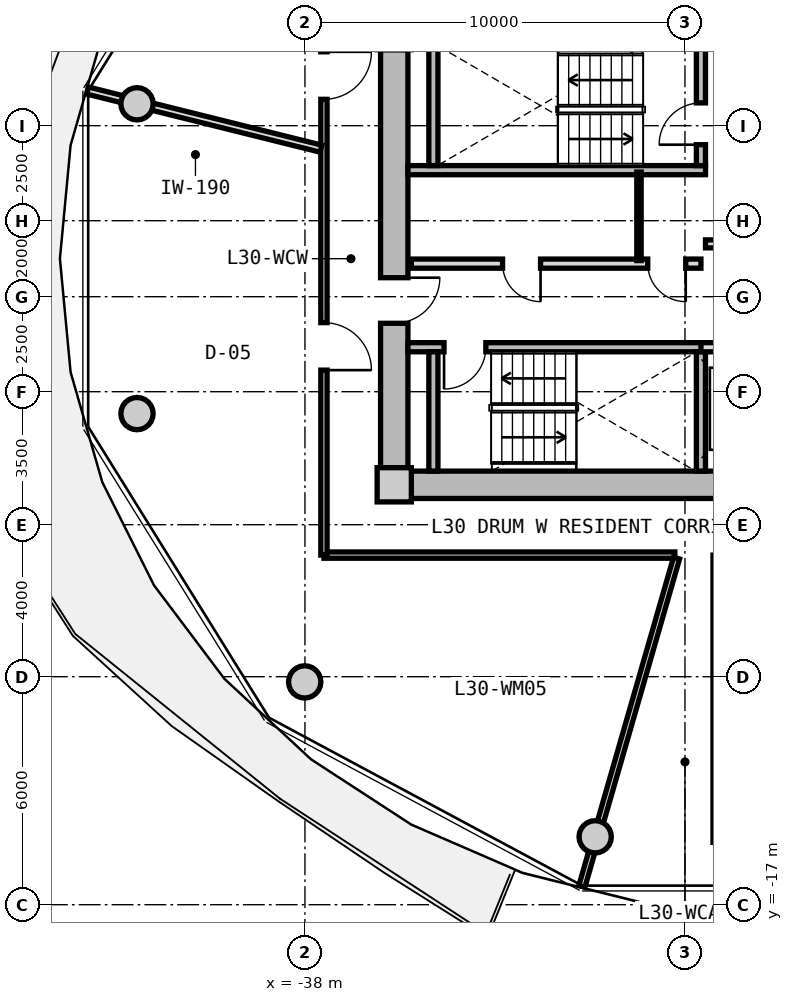
"""IFC4 building model, lengths in metres.
Left out: names, types, materials, properties, quantities, classifications, styles, units other than length and angle.
Written with IfcOpenShell. Run it as: python <this file> out.ifc"""

import sys

from ifc_helpers import new_model, si_unit, direction, frame, frame_2d, origin, origin_2d, place, context, subcontext, project, spatial, rectangle, circle, extrude, source, transform, mapped, element, fill, save


model = new_model("IFC4")
c1 = context("Model", 3, precision=1e-05, world=origin(), true_north=direction((0.0, 1.0)))
c2 = subcontext(c1, "Body", "Model", "MODEL_VIEW")
j1 = project(units=[si_unit("LENGTHUNIT", "METRE"), si_unit("PLANEANGLEUNIT", "RADIAN")], contexts=[c1])
p1 = place(None, origin())
s1 = spatial("IfcSite", under=j1, at=p1, CompositionType="ELEMENT")
p2 = place(p1, origin())
s2 = spatial("IfcBuilding", under=s1, at=p2, CompositionType="ELEMENT")
p3 = place(p2, frame((0.0, 0.0, 99.3)))
s3 = spatial("IfcBuildingStorey", under=s2, at=p3, CompositionType="ELEMENT", Elevation=99.3)
m1 = source(origin(), c2, "Body", "SweptSolid", [
    extrude(rectangle(XDim=0.9, YDim=0.9, at=origin_2d()), origin(), (0.0, 0.0, 1.0), 3.05),
])
p4 = place(p3, frame((-35.65, -5.95, 0.0), z_axis=(0.0, 0.0, 1.0), x_axis=(1.0, 0.0, 0.0)))
e1 = element("IfcColumn", 1, at=p4, inside=s3, PredefinedType="COLUMN", context=c2, shape_type="MappedRepresentation", body=[
    mapped(m1, transform((0.0, 0.0, 0.0), x_axis=(1.0, 0.0, 0.0), y_axis=(0.0, 1.0, 0.0), z_axis=(0.0, 0.0, 1.0), scale=1.0)),
])
m2 = source(origin(), c2, "Body", "SweptSolid", [
    extrude(rectangle(XDim=14.4, YDim=0.72, at=frame_2d((7.2, 0.0))), origin(), (0.0, 0.0, 1.0), 2.79),
])
p5 = place(p3, frame((-20.8, -5.95, 0.0), z_axis=(0.0, 0.0, 1.0), x_axis=(-1.0, 0.0, 0.0)))
e2 = element("IfcWall", 2, at=p5, inside=s3, PredefinedType="SHEAR", context=c2, shape_type="MappedRepresentation", body=[
    mapped(m2, transform((0.0, 0.0, 0.0), x_axis=(1.0, 0.0, 0.0), y_axis=(0.0, 1.0, 0.0), z_axis=(0.0, 0.0, 1.0), scale=1.0)),
])
m3 = source(origin(), c2, "Body", "SweptSolid", [
    extrude(rectangle(XDim=11.0, YDim=0.72, at=frame_2d((5.5, 0.0))), origin(), (0.0, 0.0, 1.0), 2.79),
])
p6 = place(p3, frame((-35.65, -5.5, 0.0), z_axis=(0.0, 0.0, 1.0), x_axis=(0.0, 1.0, 0.0)))
e3 = element("IfcWall", 3, at=p6, inside=s3, PredefinedType="SHEAR", context=c2, shape_type="MappedRepresentation", body=[
    mapped(m3, transform((0.0, 0.0, 0.0), x_axis=(1.0, 0.0, 0.0), y_axis=(0.0, 1.0, 0.0), z_axis=(0.0, 0.0, 1.0), scale=1.0)),
])
p7 = place(p6, frame((3.8, 0.0, 0.0)))
e4 = element("IfcOpeningElement", 4, at=p7, cuts=e3, PredefinedType="OPENING", context=c2, shape_type="SweptSolid", body=[
    extrude(rectangle(XDim=1.2, YDim=2.15, at=frame_2d((0.6, 1.075))), frame((0.0, 0.37, 0.0), z_axis=(0.0, -1.0, 0.0), x_axis=(1.0, 0.0, 0.0)), (0.0, 0.0, 1.0), 0.74),
])
m4 = source(origin(), c2, "Body", "SweptSolid", [
    extrude(circle(Radius=0.425, at=origin_2d()), origin(), (0.0, 0.0, 1.0), 3.05),
])
for number, where, z_axis, x_axis in (
    (5, (-42.419, 4.076, 0.0), (0.0, 0.0, 1.0), (1.0, 0.0, 0.0)),
    (6, (-42.419, -4.076, 0.0), (0.0, 0.0, 1.0), (1.0, 0.0, 0.0)),
    (7, (-38.006, -11.137, 0.0), (0.0, 0.0, 1.0), (1.0, 0.0, 0.0)),
    (8, (-30.363, -15.213, 0.0), (0.0, 0.0, 1.0), (1.0, 0.0, 0.0)),
):
    element("IfcColumn", number, at=place(p3, frame(where, z_axis=z_axis, x_axis=x_axis)), inside=s3, PredefinedType="COLUMN", context=c2, shape_type="MappedRepresentation", body=[
        mapped(m4, transform((0.0, 0.0, 0.0), x_axis=(1.0, 0.0, 0.0), y_axis=(0.0, 1.0, 0.0), z_axis=(0.0, 0.0, 1.0), scale=1.0)),
    ])
m5 = source(origin(), c2, "Body", "SweptSolid", [
    extrude(rectangle(XDim=7.83, YDim=0.24, at=frame_2d((3.915, 0.0))), origin(), (0.0, 0.0, 1.0), 2.79),
])
p8 = place(p3, frame((-35.29, 2.33, 0.0), z_axis=(0.0, 0.0, 1.0), x_axis=(1.0, 0.0, 0.0)))
e9 = element("IfcWall", 9, at=p8, inside=s3, PredefinedType="PARTITIONING", context=c2, shape_type="MappedRepresentation", body=[
    mapped(m5, transform((0.0, 0.0, 0.0), x_axis=(1.0, 0.0, 0.0), y_axis=(0.0, 1.0, 0.0), z_axis=(0.0, 0.0, 1.0), scale=1.0)),
])
m6 = source(origin(), c2, "Body", "SweptSolid", [
    extrude(rectangle(XDim=3.14, YDim=0.24, at=frame_2d((1.57, 0.0))), origin(), (0.0, 0.0, 1.0), 2.79),
])
p9 = place(p3, frame((-34.62, 2.45, 0.0), z_axis=(0.0, 0.0, 1.0), x_axis=(0.0, 1.0, 0.0)))
e10 = element("IfcWall", 10, at=p9, inside=s3, PredefinedType="PARTITIONING", context=c2, shape_type="MappedRepresentation", body=[
    mapped(m6, transform((0.0, 0.0, 0.0), x_axis=(1.0, 0.0, 0.0), y_axis=(0.0, 1.0, 0.0), z_axis=(0.0, 0.0, 1.0), scale=1.0)),
])
p10 = place(p3, frame((-27.58, 2.45, 0.0), z_axis=(0.0, 0.0, 1.0), x_axis=(0.0, 1.0, 0.0)))
e11 = element("IfcWall", 11, at=p10, inside=s3, PredefinedType="PARTITIONING", context=c2, shape_type="MappedRepresentation", body=[
    mapped(m6, transform((0.0, 0.0, 0.0), x_axis=(1.0, 0.0, 0.0), y_axis=(0.0, 1.0, 0.0), z_axis=(0.0, 0.0, 1.0), scale=1.0)),
])
p11 = place(p10, frame((0.55, 0.0, 0.0)))
e12 = element("IfcOpeningElement", 12, at=p11, cuts=e11, PredefinedType="OPENING", context=c2, shape_type="SweptSolid", body=[
    extrude(rectangle(XDim=1.1, YDim=2.15, at=frame_2d((0.55, 1.075))), frame((0.0, 0.13, 0.0), z_axis=(0.0, -1.0, 0.0), x_axis=(1.0, 0.0, 0.0)), (0.0, 0.0, 1.0), 0.26),
])
p12 = place(p3, frame((-35.29, -2.33, 0.0), z_axis=(0.0, 0.0, 1.0), x_axis=(1.0, 0.0, 0.0)))
e13 = element("IfcWall", 13, at=p12, inside=s3, PredefinedType="PARTITIONING", context=c2, shape_type="MappedRepresentation", body=[
    mapped(m5, transform((0.0, 0.0, 0.0), x_axis=(1.0, 0.0, 0.0), y_axis=(0.0, 1.0, 0.0), z_axis=(0.0, 0.0, 1.0), scale=1.0)),
])
p13 = place(p12, frame((0.95, 0.0, 0.0)))
e14 = element("IfcOpeningElement", 14, at=p13, cuts=e13, PredefinedType="OPENING", context=c2, shape_type="SweptSolid", body=[
    extrude(rectangle(XDim=1.1, YDim=2.15, at=frame_2d((0.55, 1.075))), frame((0.0, 0.13, 0.0), z_axis=(0.0, -1.0, 0.0), x_axis=(1.0, 0.0, 0.0)), (0.0, 0.0, 1.0), 0.26),
])
for number, where, z_axis, x_axis in (
    (15, (-34.62, -5.59, 0.0), (0.0, 0.0, 1.0), (0.0, 1.0, 0.0)),
    (16, (-27.58, -5.59, 0.0), (0.0, 0.0, 1.0), (0.0, 1.0, 0.0)),
):
    element("IfcWall", number, at=place(p3, frame(where, z_axis=z_axis, x_axis=x_axis)), inside=s3, PredefinedType="PARTITIONING", context=c2, shape_type="MappedRepresentation", body=[
        mapped(m6, transform((0.0, 0.0, 0.0), x_axis=(1.0, 0.0, 0.0), y_axis=(0.0, 1.0, 0.0), z_axis=(0.0, 0.0, 1.0), scale=1.0)),
    ])
m7 = source(origin(), c2, "Body", "SweptSolid", [
    extrude(rectangle(XDim=6.66, YDim=0.21, at=frame_2d((3.33, 0.0))), origin(), (0.0, 0.0, 1.0), 2.775),
])
p14 = place(p3, frame((-27.46, 0.39, 0.0), z_axis=(0.0, 0.0, 1.0), x_axis=(1.0, 0.0, 0.0)))
e17 = element("IfcWall", 17, at=p14, inside=s3, PredefinedType="PARTITIONING", context=c2, shape_type="MappedRepresentation", body=[
    mapped(m7, transform((0.0, 0.0, 0.0), x_axis=(1.0, 0.0, 0.0), y_axis=(0.0, 1.0, 0.0), z_axis=(0.0, 0.0, 1.0), scale=1.0)),
])
p15 = place(p14, frame((1.0, 0.0, 0.0)))
e18 = element("IfcOpeningElement", 18, at=p15, cuts=e17, PredefinedType="OPENING", context=c2, shape_type="SweptSolid", body=[
    extrude(rectangle(XDim=1.2, YDim=2.15, at=frame_2d((0.6, 1.075))), frame((0.0, 0.115, 0.0), z_axis=(0.0, -1.0, 0.0), x_axis=(1.0, 0.0, 0.0)), (0.0, 0.0, 1.0), 0.23),
])
m8 = source(origin(), c2, "Body", "SweptSolid", [
    extrude(rectangle(XDim=7.62, YDim=0.24, at=frame_2d((3.81, 0.0))), origin(), (0.0, 0.0, 1.0), 2.775),
])
p16 = place(p3, frame((-35.2, -0.13, 0.0), z_axis=(0.0, 0.0, 1.0), x_axis=(1.0, 0.0, 0.0)))
e19 = element("IfcWall", 19, at=p16, inside=s3, PredefinedType="PARTITIONING", context=c2, shape_type="MappedRepresentation", body=[
    mapped(m8, transform((0.0, 0.0, 0.0), x_axis=(1.0, 0.0, 0.0), y_axis=(0.0, 1.0, 0.0), z_axis=(0.0, 0.0, 1.0), scale=1.0)),
])
p17 = place(p16, frame((6.22, 0.0, 0.0)))
e20 = element("IfcOpeningElement", 20, at=p17, cuts=e19, PredefinedType="OPENING", context=c2, shape_type="SweptSolid", body=[
    extrude(rectangle(XDim=1.0, YDim=2.1, at=frame_2d((0.5, 1.05))), frame((0.0, 0.13, 0.0), z_axis=(0.0, -1.0, 0.0), x_axis=(1.0, 0.0, 0.0)), (0.0, 0.0, 1.0), 0.26),
])
p18 = place(p16, frame((2.4, 0.0, 0.0)))
e21 = element("IfcOpeningElement", 21, at=p18, cuts=e19, PredefinedType="OPENING", context=c2, shape_type="SweptSolid", body=[
    extrude(rectangle(XDim=1.0, YDim=2.1, at=frame_2d((0.5, 1.05))), frame((0.0, 0.13, 0.0), z_axis=(0.0, -1.0, 0.0), x_axis=(1.0, 0.0, 0.0)), (0.0, 0.0, 1.0), 0.26),
])
m9 = source(origin(), c2, "Body", "SweptSolid", [
    extrude(rectangle(XDim=2.33, YDim=0.115, at=frame_2d((1.165, 0.0))), origin(), (0.0, 0.0, 1.0), 2.775),
])
p19 = place(p3, frame((-29.21, -0.05, 0.0), z_axis=(0.0, 0.0, 1.0), x_axis=(0.0, 1.0, 0.0)))
e22 = element("IfcWall", 22, at=p19, inside=s3, PredefinedType="PARTITIONING", context=c2, shape_type="MappedRepresentation", body=[
    mapped(m9, transform((0.0, 0.0, 0.0), x_axis=(1.0, 0.0, 0.0), y_axis=(0.0, 1.0, 0.0), z_axis=(0.0, 0.0, 1.0), scale=1.0)),
])
m10 = source(origin(), c2, "Body", "SweptSolid", [
    extrude(rectangle(XDim=4.13, YDim=0.24, at=frame_2d((2.065, 0.0))), origin(), (0.0, 0.0, 1.0), 2.775),
])
p20 = place(p3, frame((-27.58, -2.33, 0.0), z_axis=(0.0, 0.0, 1.0), x_axis=(1.0, 0.0, 0.0)))
e23 = element("IfcWall", 23, at=p20, inside=s3, PredefinedType="PARTITIONING", context=c2, shape_type="MappedRepresentation", body=[
    mapped(m10, transform((0.0, 0.0, 0.0), x_axis=(1.0, 0.0, 0.0), y_axis=(0.0, 1.0, 0.0), z_axis=(0.0, 0.0, 1.0), scale=1.0)),
])
p21 = place(p20, frame((0.5, 0.0, 0.0)))
e24 = element("IfcOpeningElement", 24, at=p21, cuts=e23, PredefinedType="OPENING", context=c2, shape_type="SweptSolid", body=[
    extrude(rectangle(XDim=1.1, YDim=2.2, at=frame_2d((0.55, 1.1))), frame((0.0, 0.13, 0.0), z_axis=(0.0, -1.0, 0.0), x_axis=(1.0, 0.0, 0.0)), (0.0, 0.0, 1.0), 0.26),
])
m11 = source(origin(), c2, "Body", "SweptSolid", [
    extrude(rectangle(XDim=9.234, YDim=0.165, at=frame_2d((4.617, 0.0))), origin(), (0.0, 0.0, 1.0), 2.775),
])
p22 = place(p3, frame((-28.266, -7.8, 0.0), z_axis=(0.0, 0.0, 1.0), x_axis=(-1.0, 0.0, 0.0)))
e25 = element("IfcWall", 25, at=p22, inside=s3, PredefinedType="PARTITIONING", context=c2, shape_type="MappedRepresentation", body=[
    mapped(m11, transform((0.0, 0.0, 0.0), x_axis=(1.0, 0.0, 0.0), y_axis=(0.0, 1.0, 0.0), z_axis=(0.0, 0.0, 1.0), scale=1.0)),
])
m12 = source(origin(), c2, "Body", "SweptSolid", [
    extrude(rectangle(XDim=15.6, YDim=0.165, at=frame_2d((7.8, 0.0))), origin(), (0.0, 0.0, 1.0), 2.775),
])
p23 = place(p3, frame((-37.5, -7.8, 0.0), z_axis=(0.0, 0.0, 1.0), x_axis=(0.0, 1.0, 0.0)))
e26 = element("IfcWall", 26, at=p23, inside=s3, PredefinedType="PARTITIONING", context=c2, shape_type="MappedRepresentation", body=[
    mapped(m12, transform((0.0, 0.0, 0.0), x_axis=(1.0, 0.0, 0.0), y_axis=(0.0, 1.0, 0.0), z_axis=(0.0, 0.0, 1.0), scale=1.0)),
])
p24 = place(p23, frame((11.994, 0.0, 0.0)))
e27 = element("IfcOpeningElement", 27, at=p24, cuts=e26, PredefinedType="OPENING", context=c2, shape_type="SweptSolid", body=[
    extrude(rectangle(XDim=1.25, YDim=2.2, at=frame_2d((0.625, 1.1))), frame((0.0, 0.093, 0.0), z_axis=(0.0, -1.0, 0.0), x_axis=(1.0, 0.0, 0.0)), (0.0, 0.0, 1.0), 0.185),
])
p25 = place(p23, frame((4.867, 0.0, 0.0)))
e28 = element("IfcOpeningElement", 28, at=p25, cuts=e26, PredefinedType="OPENING", context=c2, shape_type="SweptSolid", body=[
    extrude(rectangle(XDim=1.25, YDim=2.2, at=frame_2d((0.625, 1.1))), frame((0.0, 0.093, 0.0), z_axis=(0.0, -1.0, 0.0), x_axis=(1.0, 0.0, 0.0)), (0.0, 0.0, 1.0), 0.185),
])
m13 = source(origin(), c2, "Body", "SweptSolid", [
    extrude(rectangle(XDim=8.989, YDim=0.165, at=frame_2d((4.495, 0.0))), origin(), (0.0, 0.0, 1.0), 2.275),
])
p26 = place(p3, frame((-28.222, -7.88, 0.0), z_axis=(0.0, 0.0, 1.0), x_axis=(-0.27702323008, -0.960863221274, 0.0)))
e29 = element("IfcWall", 29, at=p26, inside=s3, PredefinedType="PARTITIONING", context=c2, shape_type="MappedRepresentation", body=[
    mapped(m13, transform((0.0, 0.0, 0.0), x_axis=(1.0, 0.0, 0.0), y_axis=(0.0, 1.0, 0.0), z_axis=(0.0, 0.0, 1.0), scale=1.0)),
])
m14 = source(origin(), c2, "Body", "SweptSolid", [
    extrude(rectangle(XDim=6.331, YDim=0.19, at=frame_2d((3.165, 0.0))), origin(), (0.0, 0.0, 1.0), 2.275),
])
p27 = place(p3, frame((-37.58, 2.896, 0.0), z_axis=(0.0, 0.0, 1.0), x_axis=(-0.97036440661, 0.241646267062, 0.0)))
e30 = element("IfcWall", 30, at=p27, inside=s3, PredefinedType="PARTITIONING", context=c2, shape_type="MappedRepresentation", body=[
    mapped(m14, transform((0.0, 0.0, 0.0), x_axis=(1.0, 0.0, 0.0), y_axis=(0.0, 1.0, 0.0), z_axis=(0.0, 0.0, 1.0), scale=1.0)),
])
m15 = source(origin(), c2, "Body", "SweptSolid", [
    extrude(rectangle(XDim=1.1, YDim=2.15, at=frame_2d((0.55, 1.075))), frame((0.0, 0.025, 0.0), z_axis=(0.0, -1.0, 0.0), x_axis=(1.0, 0.0, 0.0)), (0.0, 0.0, 1.0), 0.05),
])
p28 = place(p11, origin())
e31 = element("IfcDoor", 31, at=p28, inside=s3, OperationType="SINGLE_SWING_LEFT", PredefinedType="DOOR", context=c2, shape_type="MappedRepresentation", body=[
    mapped(m15, transform((0.0, 0.0, 0.0), x_axis=(1.0, 0.0, 0.0), y_axis=(0.0, 1.0, 0.0), z_axis=(0.0, 0.0, 1.0), scale=1.0)),
])
fill(e12, e31)
p29 = place(p13, frame((1.1, 0.0, 0.0), z_axis=(0.0, 0.0, 1.0), x_axis=(-1.0, 0.0, 0.0)))
e32 = element("IfcDoor", 32, at=p29, inside=s3, OperationType="SINGLE_SWING_RIGHT", PredefinedType="DOOR", context=c2, shape_type="MappedRepresentation", body=[
    mapped(m15, transform((0.0, 0.0, 0.0), x_axis=(1.0, 0.0, 0.0), y_axis=(0.0, 1.0, 0.0), z_axis=(0.0, 0.0, 1.0), scale=1.0)),
])
fill(e14, e32)
m16 = source(origin(), c2, "Body", "SweptSolid", [
    extrude(rectangle(XDim=1.2, YDim=2.15, at=frame_2d((0.6, 1.075))), frame((0.0, 0.025, 0.0), z_axis=(0.0, -1.0, 0.0), x_axis=(1.0, 0.0, 0.0)), (0.0, 0.0, 1.0), 0.05),
])
p30 = place(p7, frame((1.2, 0.0, 0.0), z_axis=(0.0, 0.0, 1.0), x_axis=(-1.0, 0.0, 0.0)))
e33 = element("IfcDoor", 33, at=p30, inside=s3, OperationType="SINGLE_SWING_LEFT", PredefinedType="DOOR", context=c2, shape_type="MappedRepresentation", body=[
    mapped(m16, transform((0.0, 0.0, 0.0), x_axis=(1.0, 0.0, 0.0), y_axis=(0.0, 1.0, 0.0), z_axis=(0.0, 0.0, 1.0), scale=1.0)),
])
fill(e4, e33)
m17 = source(origin(), c2, "Body", "SweptSolid", [
    extrude(rectangle(XDim=1.0, YDim=2.1, at=frame_2d((0.5, 1.05))), frame((0.0, 0.025, 0.0), z_axis=(0.0, -1.0, 0.0), x_axis=(1.0, 0.0, 0.0)), (0.0, 0.0, 1.0), 0.05),
])
p31 = place(p17, frame((1.0, 0.0, 0.0), z_axis=(0.0, 0.0, 1.0), x_axis=(-1.0, 0.0, 0.0)))
e34 = element("IfcDoor", 34, at=p31, inside=s3, OperationType="SINGLE_SWING_LEFT", PredefinedType="DOOR", context=c2, shape_type="MappedRepresentation", body=[
    mapped(m17, transform((0.0, 0.0, 0.0), x_axis=(1.0, 0.0, 0.0), y_axis=(0.0, 1.0, 0.0), z_axis=(0.0, 0.0, 1.0), scale=1.0)),
])
fill(e20, e34)
p32 = place(p18, frame((1.0, 0.0, 0.0), z_axis=(0.0, 0.0, 1.0), x_axis=(-1.0, 0.0, 0.0)))
e35 = element("IfcDoor", 35, at=p32, inside=s3, OperationType="SINGLE_SWING_LEFT", PredefinedType="DOOR", context=c2, shape_type="MappedRepresentation", body=[
    mapped(m17, transform((0.0, 0.0, 0.0), x_axis=(1.0, 0.0, 0.0), y_axis=(0.0, 1.0, 0.0), z_axis=(0.0, 0.0, 1.0), scale=1.0)),
])
fill(e21, e35)
m18 = source(origin(), c2, "Body", "SweptSolid", [
    extrude(rectangle(XDim=1.25, YDim=2.2, at=frame_2d((0.625, 1.1))), frame((0.0, 0.025, 0.0), z_axis=(0.0, -1.0, 0.0), x_axis=(1.0, 0.0, 0.0)), (0.0, 0.0, 1.0), 0.05),
])
p33 = place(p24, frame((1.25, 0.0, 0.0), z_axis=(0.0, 0.0, 1.0), x_axis=(-1.0, 0.0, 0.0)))
e36 = element("IfcDoor", 36, at=p33, inside=s3, OperationType="SINGLE_SWING_LEFT", PredefinedType="DOOR", context=c2, shape_type="MappedRepresentation", body=[
    mapped(m18, transform((0.0, 0.0, 0.0), x_axis=(1.0, 0.0, 0.0), y_axis=(0.0, 1.0, 0.0), z_axis=(0.0, 0.0, 1.0), scale=1.0)),
])
fill(e27, e36)
p34 = place(p25, frame((1.25, 0.0, 0.0), z_axis=(0.0, 0.0, 1.0), x_axis=(-1.0, 0.0, 0.0)))
e37 = element("IfcDoor", 37, at=p34, inside=s3, OperationType="SINGLE_SWING_RIGHT", PredefinedType="DOOR", context=c2, shape_type="MappedRepresentation", body=[
    mapped(m18, transform((0.0, 0.0, 0.0), x_axis=(1.0, 0.0, 0.0), y_axis=(0.0, 1.0, 0.0), z_axis=(0.0, 0.0, 1.0), scale=1.0)),
])
fill(e28, e37)
save(model, sys.argv[1])
